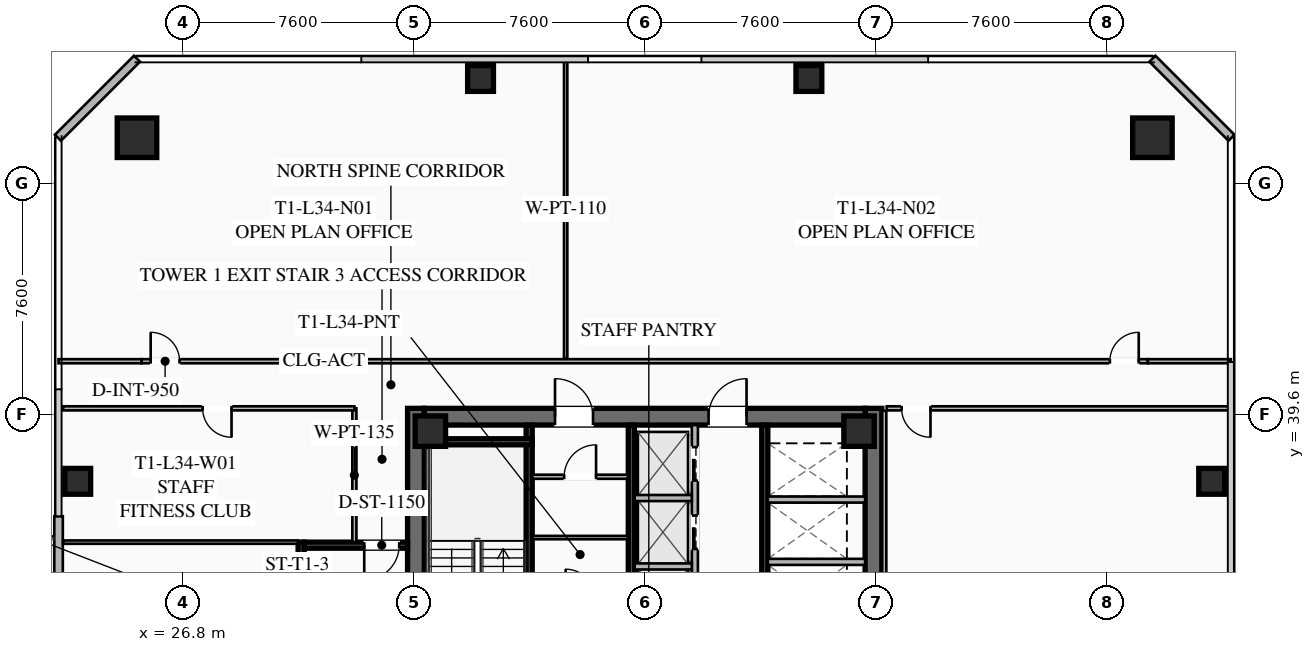
"""IFC4 building model, lengths in metres.
Left out: names, types, materials, properties, quantities, classifications, styles, units other than length and angle.
Written with IfcOpenShell. Run it as: python <this file> out.ifc"""

import sys

from ifc_helpers import new_model, si_unit, direction, frame, frame_2d, origin, origin_2d, place, context, subcontext, project, spatial, rectangle, hollow_rectangle, extrude, element, fill, save


model = new_model("IFC4")
c1 = context("Model", 3, precision=1e-05, world=origin(), true_north=direction((0.0, 1.0)))
c2 = subcontext(c1, "Body", "Model", "MODEL_VIEW")
j1 = project(units=[si_unit("LENGTHUNIT", "METRE"), si_unit("PLANEANGLEUNIT", "RADIAN")], contexts=[c1])
p1 = place(None, origin())
s1 = spatial("IfcSite", under=j1, at=p1, CompositionType="ELEMENT")
p2 = place(p1, origin())
s2 = spatial("IfcBuilding", under=s1, at=p2, CompositionType="ELEMENT")
p3 = place(p2, frame((0.0, 0.0, 128.6)))
s3 = spatial("IfcBuildingStorey", under=s2, at=p3, CompositionType="ELEMENT", Elevation=128.6)
for number, where, z_axis, x_axis in (
    (1, (34.475, 24.2, 0.0), (0.0, 0.0, 1.0), (0.0, 1.0, 0.0)),
    (2, (49.525, 39.8, 0.0), (0.0, 0.0, 1.0), (0.0, -1.0, 0.0)),
):
    element("IfcWall", number, at=place(p3, frame(where, z_axis=z_axis, x_axis=x_axis)), inside=s3, PredefinedType="SHEAR", context=c2, shape_type="SweptSolid", body=[
        extrude(rectangle(XDim=15.6, YDim=0.55, at=frame_2d((7.8, 0.0))), origin(), (0.0, 0.0, 1.0), 3.55),
    ])
p4 = place(p3, frame((34.75, 39.525, 0.0), z_axis=(0.0, 0.0, 1.0), x_axis=(1.0, 0.0, 0.0)))
e3 = element("IfcWall", 3, at=p4, inside=s3, PredefinedType="SHEAR", context=c2, shape_type="SweptSolid", body=[
    extrude(rectangle(XDim=14.5, YDim=0.55, at=frame_2d((7.25, 0.0))), origin(), (0.0, 0.0, 1.0), 3.55),
])
p5 = place(p4, frame((4.3, 0.0, 0.0)))
e4 = element("IfcOpeningElement", 4, at=p5, cuts=e3, PredefinedType="OPENING", context=c2, shape_type="SweptSolid", body=[
    extrude(rectangle(XDim=1.25, YDim=2.25, at=frame_2d((0.625, 1.125))), frame((0.0, 0.285, 0.0), z_axis=(0.0, -1.0, 0.0), x_axis=(1.0, 0.0, 0.0)), (0.0, 0.0, 1.0), 0.57),
])
p6 = place(p4, frame((9.35, 0.0, 0.0)))
e5 = element("IfcOpeningElement", 5, at=p6, cuts=e3, PredefinedType="OPENING", context=c2, shape_type="SweptSolid", body=[
    extrude(rectangle(XDim=1.25, YDim=2.25, at=frame_2d((0.625, 1.125))), frame((0.0, 0.285, 0.0), z_axis=(0.0, -1.0, 0.0), x_axis=(1.0, 0.0, 0.0)), (0.0, 0.0, 1.0), 0.57),
])
for number, where, z_axis, x_axis in (
    (6, (49.05, 39.05, 0.0), (0.0, 0.0, 1.0), (1.0, 0.0, 0.0)),
    (7, (34.95, 39.05, 0.0), (0.0, 0.0, 1.0), (1.0, 0.0, 0.0)),
):
    element("IfcColumn", number, at=place(p3, frame(where, z_axis=z_axis, x_axis=x_axis)), inside=s3, PredefinedType="COLUMN", context=c2, shape_type="SweptSolid", body=[
        extrude(hollow_rectangle(XDim=1.0, YDim=1.0, WallThickness=0.04, at=origin_2d()), origin(), (0.0, 0.0, 1.0), 3.37),
    ])
for number, where, z_axis, x_axis in (
    (8, (58.7, 48.7, 0.0), (0.0, 0.0, 1.0), (1.0, 0.0, 0.0)),
    (9, (25.3, 48.7, 0.0), (0.0, 0.0, 1.0), (1.0, 0.0, 0.0)),
):
    element("IfcColumn", number, at=place(p3, frame(where, z_axis=z_axis, x_axis=x_axis)), inside=s3, PredefinedType="COLUMN", context=c2, shape_type="SweptSolid", body=[
        extrude(hollow_rectangle(XDim=1.3, YDim=1.3, WallThickness=0.05, at=origin_2d()), origin(), (0.0, 0.0, 1.0), 3.37),
    ])
for number, where, z_axis, x_axis in (
    (10, (60.65, 37.4, 0.0), (0.0, 0.0, 1.0), (1.0, 0.0, 0.0)),
    (11, (47.4, 50.65, 0.0), (0.0, 0.0, 1.0), (1.0, 0.0, 0.0)),
    (12, (36.6, 50.65, 0.0), (0.0, 0.0, 1.0), (1.0, 0.0, 0.0)),
    (13, (23.35, 37.4, 0.0), (0.0, 0.0, 1.0), (1.0, 0.0, 0.0)),
):
    element("IfcColumn", number, at=place(p3, frame(where, z_axis=z_axis, x_axis=x_axis)), inside=s3, PredefinedType="COLUMN", context=c2, shape_type="SweptSolid", body=[
        extrude(hollow_rectangle(XDim=0.85, YDim=0.85, WallThickness=0.035, at=origin_2d()), origin(), (0.0, 0.0, 1.0), 3.37),
    ])
p7 = place(p3, frame((22.72, 27.75, 0.0), z_axis=(0.0, 0.0, 1.0), x_axis=(0.0, 1.0, 0.0)))
e14 = element("IfcWall", 14, at=p7, inside=s3, PredefinedType="SOLIDWALL", context=c2, shape_type="SweptSolid", body=[
    extrude(rectangle(XDim=8.5, YDim=0.28, at=frame_2d((4.25, 0.0))), origin(), (0.0, 0.0, 1.0), 3.37),
])
p8 = place(p7, frame((3.6, 0.0, 0.0)))
e15 = element("IfcOpeningElement", 15, at=p8, cuts=e14, PredefinedType="OPENING", context=c2, shape_type="SweptSolid", body=[
    extrude(rectangle(XDim=1.3, YDim=2.15, at=frame_2d((0.65, 1.075))), frame((0.0, 0.15, 0.0), z_axis=(0.0, -1.0, 0.0), x_axis=(1.0, 0.0, 0.0)), (0.0, 0.0, 1.0), 0.3),
])
p9 = place(p7, frame((1.46, 0.0, 0.85)))
e16 = element("IfcOpeningElement", 16, at=p9, cuts=e14, PredefinedType="OPENING", context=c2, shape_type="SweptSolid", body=[
    extrude(rectangle(XDim=1.8, YDim=1.92, at=frame_2d((0.9, 0.96))), frame((0.0, 0.15, 0.0), z_axis=(0.0, -1.0, 0.0), x_axis=(1.0, 0.0, 0.0)), (0.0, 0.0, 1.0), 0.3),
])
for number, where, z_axis, x_axis in (
    (17, (22.7, 48.7, 0.0), (0.0, 0.0, 1.0), (0.707, 0.707, 0.0)),
    (18, (58.7, 51.3, 0.0), (0.0, 0.0, 1.0), (0.707, -0.707, 0.0)),
):
    element("IfcWall", number, at=place(p3, frame(where, z_axis=z_axis, x_axis=x_axis)), inside=s3, PredefinedType="SOLIDWALL", context=c2, shape_type="SweptSolid", body=[
        extrude(rectangle(XDim=3.677, YDim=0.28, at=frame_2d((1.838, 0.0))), origin(), (0.0, 0.0, 1.0), 3.37),
    ])
p10 = place(p3, frame((38.2, 31.2, 0.0), z_axis=(0.0, 0.0, 1.0), x_axis=(0.0, 1.0, 0.0)))
e19 = element("IfcWall", 19, at=p10, inside=s3, PredefinedType="SHEAR", context=c2, shape_type="SweptSolid", body=[
    extrude(rectangle(XDim=8.05, YDim=0.2, at=frame_2d((4.025, 0.0))), origin(), (0.0, 0.0, 1.0), 3.37),
])
p11 = place(p10, frame((0.45, 0.0, 0.0)))
e20 = element("IfcOpeningElement", 20, at=p11, cuts=e19, PredefinedType="OPENING", context=c2, shape_type="SweptSolid", body=[
    extrude(rectangle(XDim=1.15, YDim=2.2, at=frame_2d((0.575, 1.1))), frame((0.0, 0.11, 0.0), z_axis=(0.0, -1.0, 0.0), x_axis=(1.0, 0.0, 0.0)), (0.0, 0.0, 1.0), 0.22),
])
p12 = place(p3, frame((34.75, 38.7, 0.0), z_axis=(0.0, 0.0, 1.0), x_axis=(1.0, 0.0, 0.0)))
e21 = element("IfcWall", 21, at=p12, inside=s3, PredefinedType="SHEAR", context=c2, shape_type="SweptSolid", body=[
    extrude(rectangle(XDim=3.55, YDim=0.2, at=frame_2d((1.775, 0.0))), origin(), (0.0, 0.0, 1.0), 3.37),
])
p13 = place(p3, frame((41.56, 24.75, 0.0), z_axis=(0.0, 0.0, 1.0), x_axis=(0.0, 1.0, 0.0)))
e22 = element("IfcWall", 22, at=p13, inside=s3, PredefinedType="SHEAR", context=c2, shape_type="SweptSolid", body=[
    extrude(rectangle(XDim=14.5, YDim=0.2, at=frame_2d((7.25, 0.0))), origin(), (0.0, 0.0, 1.0), 3.37),
])
p14 = place(p3, frame((45.95, 39.25, 0.0), z_axis=(0.0, 0.0, 1.0), x_axis=(0.0, -1.0, 0.0)))
e23 = element("IfcWall", 23, at=p14, inside=s3, PredefinedType="SHEAR", context=c2, shape_type="SweptSolid", body=[
    extrude(rectangle(XDim=6.45, YDim=0.2, at=frame_2d((3.225, 0.0))), origin(), (0.0, 0.0, 1.0), 3.37),
])
for number, where, z_axis, x_axis in (
    (24, (46.05, 34.75, 0.0), (0.0, 0.0, 1.0), (1.0, 0.0, 0.0)),
    (25, (46.05, 36.8, 0.0), (0.0, 0.0, 1.0), (1.0, 0.0, 0.0)),
):
    element("IfcWall", number, at=place(p3, frame(where, z_axis=z_axis, x_axis=x_axis)), inside=s3, PredefinedType="SOLIDWALL", context=c2, shape_type="SweptSolid", body=[
        extrude(rectangle(XDim=3.2, YDim=0.2, at=frame_2d((1.6, 0.0))), origin(), (0.0, 0.0, 1.0), 3.37),
    ])
p15 = place(p3, frame((38.3, 37.55, 0.0), z_axis=(0.0, 0.0, 1.0), x_axis=(1.0, 0.0, 0.0)))
e26 = element("IfcWall", 26, at=p15, inside=s3, PredefinedType="PARTITIONING", context=c2, shape_type="SweptSolid", body=[
    extrude(rectangle(XDim=3.15, YDim=0.135, at=frame_2d((1.575, 0.0))), origin(), (0.0, 0.0, 1.0), 2.723),
])
p16 = place(p15, frame((1.05, 0.0, 0.0)))
e27 = element("IfcOpeningElement", 27, at=p16, cuts=e26, PredefinedType="OPENING", context=c2, shape_type="SweptSolid", body=[
    extrude(rectangle(XDim=1.05, YDim=2.2, at=frame_2d((0.525, 1.1))), frame((0.0, 0.077, 0.0), z_axis=(0.0, -1.0, 0.0), x_axis=(1.0, 0.0, 0.0)), (0.0, 0.0, 1.0), 0.155),
])
p17 = place(p3, frame((38.3, 35.55, 0.0), z_axis=(0.0, 0.0, 1.0), x_axis=(1.0, 0.0, 0.0)))
e28 = element("IfcWall", 28, at=p17, inside=s3, PredefinedType="PARTITIONING", context=c2, shape_type="SweptSolid", body=[
    extrude(rectangle(XDim=3.15, YDim=0.11, at=frame_2d((1.575, 0.0))), origin(), (0.0, 0.0, 1.0), 2.723),
])
p18 = place(p3, frame((43.65, 32.35, 0.0), z_axis=(0.0, 0.0, 1.0), x_axis=(0.0, 1.0, 0.0)))
e29 = element("IfcWall", 29, at=p18, inside=s3, PredefinedType="SOLIDWALL", context=c2, shape_type="SweptSolid", body=[
    extrude(rectangle(XDim=6.9, YDim=0.2, at=frame_2d((3.45, 0.0))), origin(), (0.0, 0.0, 1.0), 3.37),
])
p19 = place(p18, frame((0.575, 0.0, 0.0)))
e30 = element("IfcOpeningElement", 30, at=p19, cuts=e29, PredefinedType="OPENING", context=c2, shape_type="SweptSolid", body=[
    extrude(rectangle(XDim=1.1, YDim=2.2, at=frame_2d((0.55, 1.1))), frame((0.0, 0.11, 0.0), z_axis=(0.0, -1.0, 0.0), x_axis=(1.0, 0.0, 0.0)), (0.0, 0.0, 1.0), 0.22),
])
p20 = place(p18, frame((2.825, 0.0, 0.0)))
e31 = element("IfcOpeningElement", 31, at=p20, cuts=e29, PredefinedType="OPENING", context=c2, shape_type="SweptSolid", body=[
    extrude(rectangle(XDim=1.1, YDim=2.2, at=frame_2d((0.55, 1.1))), frame((0.0, 0.11, 0.0), z_axis=(0.0, -1.0, 0.0), x_axis=(1.0, 0.0, 0.0)), (0.0, 0.0, 1.0), 0.22),
])
p21 = place(p18, frame((5.075, 0.0, 0.0)))
e32 = element("IfcOpeningElement", 32, at=p21, cuts=e29, PredefinedType="OPENING", context=c2, shape_type="SweptSolid", body=[
    extrude(rectangle(XDim=1.1, YDim=2.2, at=frame_2d((0.55, 1.1))), frame((0.0, 0.11, 0.0), z_axis=(0.0, -1.0, 0.0), x_axis=(1.0, 0.0, 0.0)), (0.0, 0.0, 1.0), 0.22),
])
for number, where, z_axis, x_axis in (
    (33, (41.67, 34.6, 0.0), (0.0, 0.0, 1.0), (1.0, 0.0, 0.0)),
    (34, (41.67, 36.85, 0.0), (0.0, 0.0, 1.0), (1.0, 0.0, 0.0)),
):
    element("IfcWall", number, at=place(p3, frame(where, z_axis=z_axis, x_axis=x_axis)), inside=s3, PredefinedType="SOLIDWALL", context=c2, shape_type="SweptSolid", body=[
        extrude(rectangle(XDim=1.88, YDim=0.2, at=frame_2d((0.94, 0.0))), origin(), (0.0, 0.0, 1.0), 3.37),
    ])
p22 = place(p3, frame((30.7, 28.6, 0.0), z_axis=(0.0, 0.0, 1.0), x_axis=(0.0, 1.0, 0.0)))
e35 = element("IfcWall", 35, at=p22, inside=s3, PredefinedType="SHEAR", context=c2, shape_type="SweptSolid", body=[
    extrude(rectangle(XDim=6.8, YDim=0.2, at=frame_2d((3.4, 0.0))), origin(), (0.0, 0.0, 1.0), 3.37),
])
p23 = place(p3, frame((34.2, 35.3, 0.0), z_axis=(0.0, 0.0, 1.0), x_axis=(-1.0, 0.0, 0.0)))
e36 = element("IfcWall", 36, at=p23, inside=s3, PredefinedType="SHEAR", context=c2, shape_type="SweptSolid", body=[
    extrude(rectangle(XDim=3.4, YDim=0.2, at=frame_2d((1.7, 0.0))), origin(), (0.0, 0.0, 1.0), 3.37),
])
p24 = place(p23, frame((0.275, 0.0, 0.0)))
e37 = element("IfcOpeningElement", 37, at=p24, cuts=e36, PredefinedType="OPENING", context=c2, shape_type="SweptSolid", body=[
    extrude(rectangle(XDim=1.15, YDim=2.2, at=frame_2d((0.575, 1.1))), frame((0.0, 0.11, 0.0), z_axis=(0.0, -1.0, 0.0), x_axis=(1.0, 0.0, 0.0)), (0.0, 0.0, 1.0), 0.22),
])
p25 = place(p3, frame((32.45, 35.4, 0.0), z_axis=(0.0, 0.0, 1.0), x_axis=(0.0, 1.0, 0.0)))
e38 = element("IfcWall", 38, at=p25, inside=s3, PredefinedType="PARTITIONING", context=c2, shape_type="SweptSolid", body=[
    extrude(rectangle(XDim=4.4, YDim=0.135, at=frame_2d((2.2, 0.0))), origin(), (0.0, 0.0, 1.0), 2.723),
])
p26 = place(p3, frame((25.45, 41.35, 0.0), z_axis=(0.0, 0.0, 1.0), x_axis=(1.0, 0.0, 0.0)))
e39 = element("IfcWall", 39, at=p26, inside=s3, PredefinedType="PARTITIONING", context=c2, shape_type="SweptSolid", body=[
    extrude(rectangle(XDim=33.1, YDim=0.135, at=frame_2d((16.55, 0.0))), origin(), (0.0, 0.0, 1.0), 2.723),
])
p27 = place(p26, frame((0.3, 0.0, 0.0)))
e40 = element("IfcOpeningElement", 40, at=p27, cuts=e39, PredefinedType="OPENING", context=c2, shape_type="SweptSolid", body=[
    extrude(rectangle(XDim=0.95, YDim=2.05, at=frame_2d((0.475, 1.025))), frame((0.0, 0.077, 0.0), z_axis=(0.0, -1.0, 0.0), x_axis=(1.0, 0.0, 0.0)), (0.0, 0.0, 1.0), 0.155),
])
p28 = place(p26, frame((31.85, 0.0, 0.0)))
e41 = element("IfcOpeningElement", 41, at=p28, cuts=e39, PredefinedType="OPENING", context=c2, shape_type="SweptSolid", body=[
    extrude(rectangle(XDim=0.95, YDim=2.05, at=frame_2d((0.475, 1.025))), frame((0.0, 0.077, 0.0), z_axis=(0.0, -1.0, 0.0), x_axis=(1.0, 0.0, 0.0)), (0.0, 0.0, 1.0), 0.155),
])
for number, where, z_axis, x_axis in (
    (42, (22.72, 41.35, 0.0), (0.0, 0.0, 1.0), (1.0, 0.0, 0.0)),
    (43, (58.55, 41.35, 0.0), (0.0, 0.0, 1.0), (1.0, 0.0, 0.0)),
):
    element("IfcWall", number, at=place(p3, frame(where, z_axis=z_axis, x_axis=x_axis)), inside=s3, PredefinedType="PARTITIONING", context=c2, shape_type="SweptSolid", body=[
        extrude(rectangle(XDim=2.73, YDim=0.135, at=frame_2d((1.365, 0.0))), origin(), (0.0, 0.0, 1.0), 2.723),
    ])
p29 = place(p3, frame((39.4, 41.43, 0.0), z_axis=(0.0, 0.0, 1.0), x_axis=(0.0, 1.0, 0.0)))
e44 = element("IfcWall", 44, at=p29, inside=s3, PredefinedType="PARTITIONING", context=c2, shape_type="SweptSolid", body=[
    extrude(rectangle(XDim=9.85, YDim=0.11, at=frame_2d((4.925, 0.0))), origin(), (0.0, 0.0, 1.0), 2.723),
])
p30 = place(p3, frame((49.88, 39.72, 0.0), z_axis=(0.0, 0.0, 1.0), x_axis=(0.0, -1.0, 0.0)))
e45 = element("IfcWall", 45, at=p30, inside=s3, PredefinedType="PARTITIONING", context=c2, shape_type="SweptSolid", body=[
    extrude(rectangle(XDim=15.44, YDim=0.135, at=frame_2d((7.72, 0.0))), origin(), (0.0, 0.0, 1.0), 2.723),
])
p31 = place(p3, frame((61.28, 39.8, 0.0), z_axis=(0.0, 0.0, 1.0), x_axis=(-1.0, 0.0, 0.0)))
e46 = element("IfcWall", 46, at=p31, inside=s3, PredefinedType="PARTITIONING", context=c2, shape_type="SweptSolid", body=[
    extrude(rectangle(XDim=11.32, YDim=0.135, at=frame_2d((5.66, 0.0))), origin(), (0.0, 0.0, 1.0), 2.723),
])
p32 = place(p31, frame((9.88, 0.0, 0.0)))
e47 = element("IfcOpeningElement", 47, at=p32, cuts=e46, PredefinedType="OPENING", context=c2, shape_type="SweptSolid", body=[
    extrude(rectangle(XDim=0.95, YDim=2.05, at=frame_2d((0.475, 1.025))), frame((0.0, 0.077, 0.0), z_axis=(0.0, -1.0, 0.0), x_axis=(1.0, 0.0, 0.0)), (0.0, 0.0, 1.0), 0.155),
])
p33 = place(p3, frame((32.45, 39.8, 0.0), z_axis=(0.0, 0.0, 1.0), x_axis=(-1.0, 0.0, 0.0)))
e48 = element("IfcWall", 48, at=p33, inside=s3, PredefinedType="PARTITIONING", context=c2, shape_type="SweptSolid", body=[
    extrude(rectangle(XDim=9.58, YDim=0.135, at=frame_2d((4.79, 0.0))), origin(), (0.0, 0.0, 1.0), 2.723),
])
p34 = place(p33, frame((4.04, 0.0, 0.0)))
e49 = element("IfcOpeningElement", 49, at=p34, cuts=e48, PredefinedType="OPENING", context=c2, shape_type="SweptSolid", body=[
    extrude(rectangle(XDim=0.95, YDim=2.05, at=frame_2d((0.475, 1.025))), frame((0.0, 0.077, 0.0), z_axis=(0.0, -1.0, 0.0), x_axis=(1.0, 0.0, 0.0)), (0.0, 0.0, 1.0), 0.155),
])
p35 = place(p3, frame((30.6, 35.4, 0.0), z_axis=(0.0, 0.0, 1.0), x_axis=(-1.0, 0.0, 0.0)))
e50 = element("IfcWall", 50, at=p35, inside=s3, PredefinedType="PARTITIONING", context=c2, shape_type="SweptSolid", body=[
    extrude(rectangle(XDim=7.73, YDim=0.11, at=frame_2d((3.865, 0.0))), origin(), (0.0, 0.0, 1.0), 2.723),
])
p36 = place(p5, origin())
e51 = element("IfcDoor", 51, at=p36, inside=s3, OperationType="SINGLE_SWING_LEFT", PredefinedType="DOOR", context=c2, shape_type="SweptSolid", body=[
    extrude(rectangle(XDim=1.25, YDim=2.25, at=frame_2d((0.625, 1.125))), frame((0.0, 0.025, 0.0), z_axis=(0.0, -1.0, 0.0), x_axis=(1.0, 0.0, 0.0)), (0.0, 0.0, 1.0), 0.05),
])
fill(e4, e51)
p37 = place(p6, origin())
e52 = element("IfcDoor", 52, at=p37, inside=s3, OperationType="SINGLE_SWING_RIGHT", PredefinedType="DOOR", context=c2, shape_type="SweptSolid", body=[
    extrude(rectangle(XDim=1.25, YDim=2.25, at=frame_2d((0.625, 1.125))), frame((0.0, 0.025, 0.0), z_axis=(0.0, -1.0, 0.0), x_axis=(1.0, 0.0, 0.0)), (0.0, 0.0, 1.0), 0.05),
])
fill(e5, e52)
p38 = place(p16, origin())
e53 = element("IfcDoor", 53, at=p38, inside=s3, OperationType="SINGLE_SWING_RIGHT", PredefinedType="DOOR", context=c2, shape_type="SweptSolid", body=[
    extrude(rectangle(XDim=1.05, YDim=2.2, at=frame_2d((0.525, 1.1))), frame((0.0, 0.025, 0.0), z_axis=(0.0, -1.0, 0.0), x_axis=(1.0, 0.0, 0.0)), (0.0, 0.0, 1.0), 0.05),
])
fill(e27, e53)
p39 = place(p24, origin())
e54 = element("IfcDoor", 54, at=p39, inside=s3, OperationType="SINGLE_SWING_RIGHT", PredefinedType="DOOR", context=c2, shape_type="SweptSolid", body=[
    extrude(rectangle(XDim=1.15, YDim=2.2, at=frame_2d((0.575, 1.1))), frame((0.0, 0.025, 0.0), z_axis=(0.0, -1.0, 0.0), x_axis=(1.0, 0.0, 0.0)), (0.0, 0.0, 1.0), 0.05),
])
fill(e37, e54)
p40 = place(p27, origin())
e55 = element("IfcDoor", 55, at=p40, inside=s3, OperationType="SINGLE_SWING_LEFT", PredefinedType="DOOR", context=c2, shape_type="SweptSolid", body=[
    extrude(rectangle(XDim=0.95, YDim=2.05, at=frame_2d((0.475, 1.025))), frame((0.0, 0.025, 0.0), z_axis=(0.0, -1.0, 0.0), x_axis=(1.0, 0.0, 0.0)), (0.0, 0.0, 1.0), 0.05),
])
fill(e40, e55)
p41 = place(p28, origin())
e56 = element("IfcDoor", 56, at=p41, inside=s3, OperationType="SINGLE_SWING_RIGHT", PredefinedType="DOOR", context=c2, shape_type="SweptSolid", body=[
    extrude(rectangle(XDim=0.95, YDim=2.05, at=frame_2d((0.475, 1.025))), frame((0.0, 0.025, 0.0), z_axis=(0.0, -1.0, 0.0), x_axis=(1.0, 0.0, 0.0)), (0.0, 0.0, 1.0), 0.05),
])
fill(e41, e56)
p42 = place(p32, origin())
e57 = element("IfcDoor", 57, at=p42, inside=s3, OperationType="SINGLE_SWING_LEFT", PredefinedType="DOOR", context=c2, shape_type="SweptSolid", body=[
    extrude(rectangle(XDim=0.95, YDim=2.05, at=frame_2d((0.475, 1.025))), frame((0.0, 0.025, 0.0), z_axis=(0.0, -1.0, 0.0), x_axis=(1.0, 0.0, 0.0)), (0.0, 0.0, 1.0), 0.05),
])
fill(e47, e57)
p43 = place(p34, origin())
e58 = element("IfcDoor", 58, at=p43, inside=s3, OperationType="SINGLE_SWING_LEFT", PredefinedType="DOOR", context=c2, shape_type="SweptSolid", body=[
    extrude(rectangle(XDim=0.95, YDim=2.05, at=frame_2d((0.475, 1.025))), frame((0.0, 0.025, 0.0), z_axis=(0.0, -1.0, 0.0), x_axis=(1.0, 0.0, 0.0)), (0.0, 0.0, 1.0), 0.05),
])
fill(e49, e58)
p44 = place(p20, origin())
e59 = element("IfcDoor", 59, at=p44, inside=s3, OperationType="SLIDING_TO_LEFT", PredefinedType="DOOR", context=c2, shape_type="SweptSolid", body=[
    extrude(rectangle(XDim=1.1, YDim=2.2, at=frame_2d((0.55, 1.1))), frame((0.0, 0.025, 0.0), z_axis=(0.0, -1.0, 0.0), x_axis=(1.0, 0.0, 0.0)), (0.0, 0.0, 1.0), 0.05),
])
fill(e31, e59)
p45 = place(p21, origin())
e60 = element("IfcDoor", 60, at=p45, inside=s3, OperationType="SLIDING_TO_LEFT", PredefinedType="DOOR", context=c2, shape_type="SweptSolid", body=[
    extrude(rectangle(XDim=1.1, YDim=2.2, at=frame_2d((0.55, 1.1))), frame((0.0, 0.025, 0.0), z_axis=(0.0, -1.0, 0.0), x_axis=(1.0, 0.0, 0.0)), (0.0, 0.0, 1.0), 0.05),
])
fill(e32, e60)
save(model, sys.argv[1])
